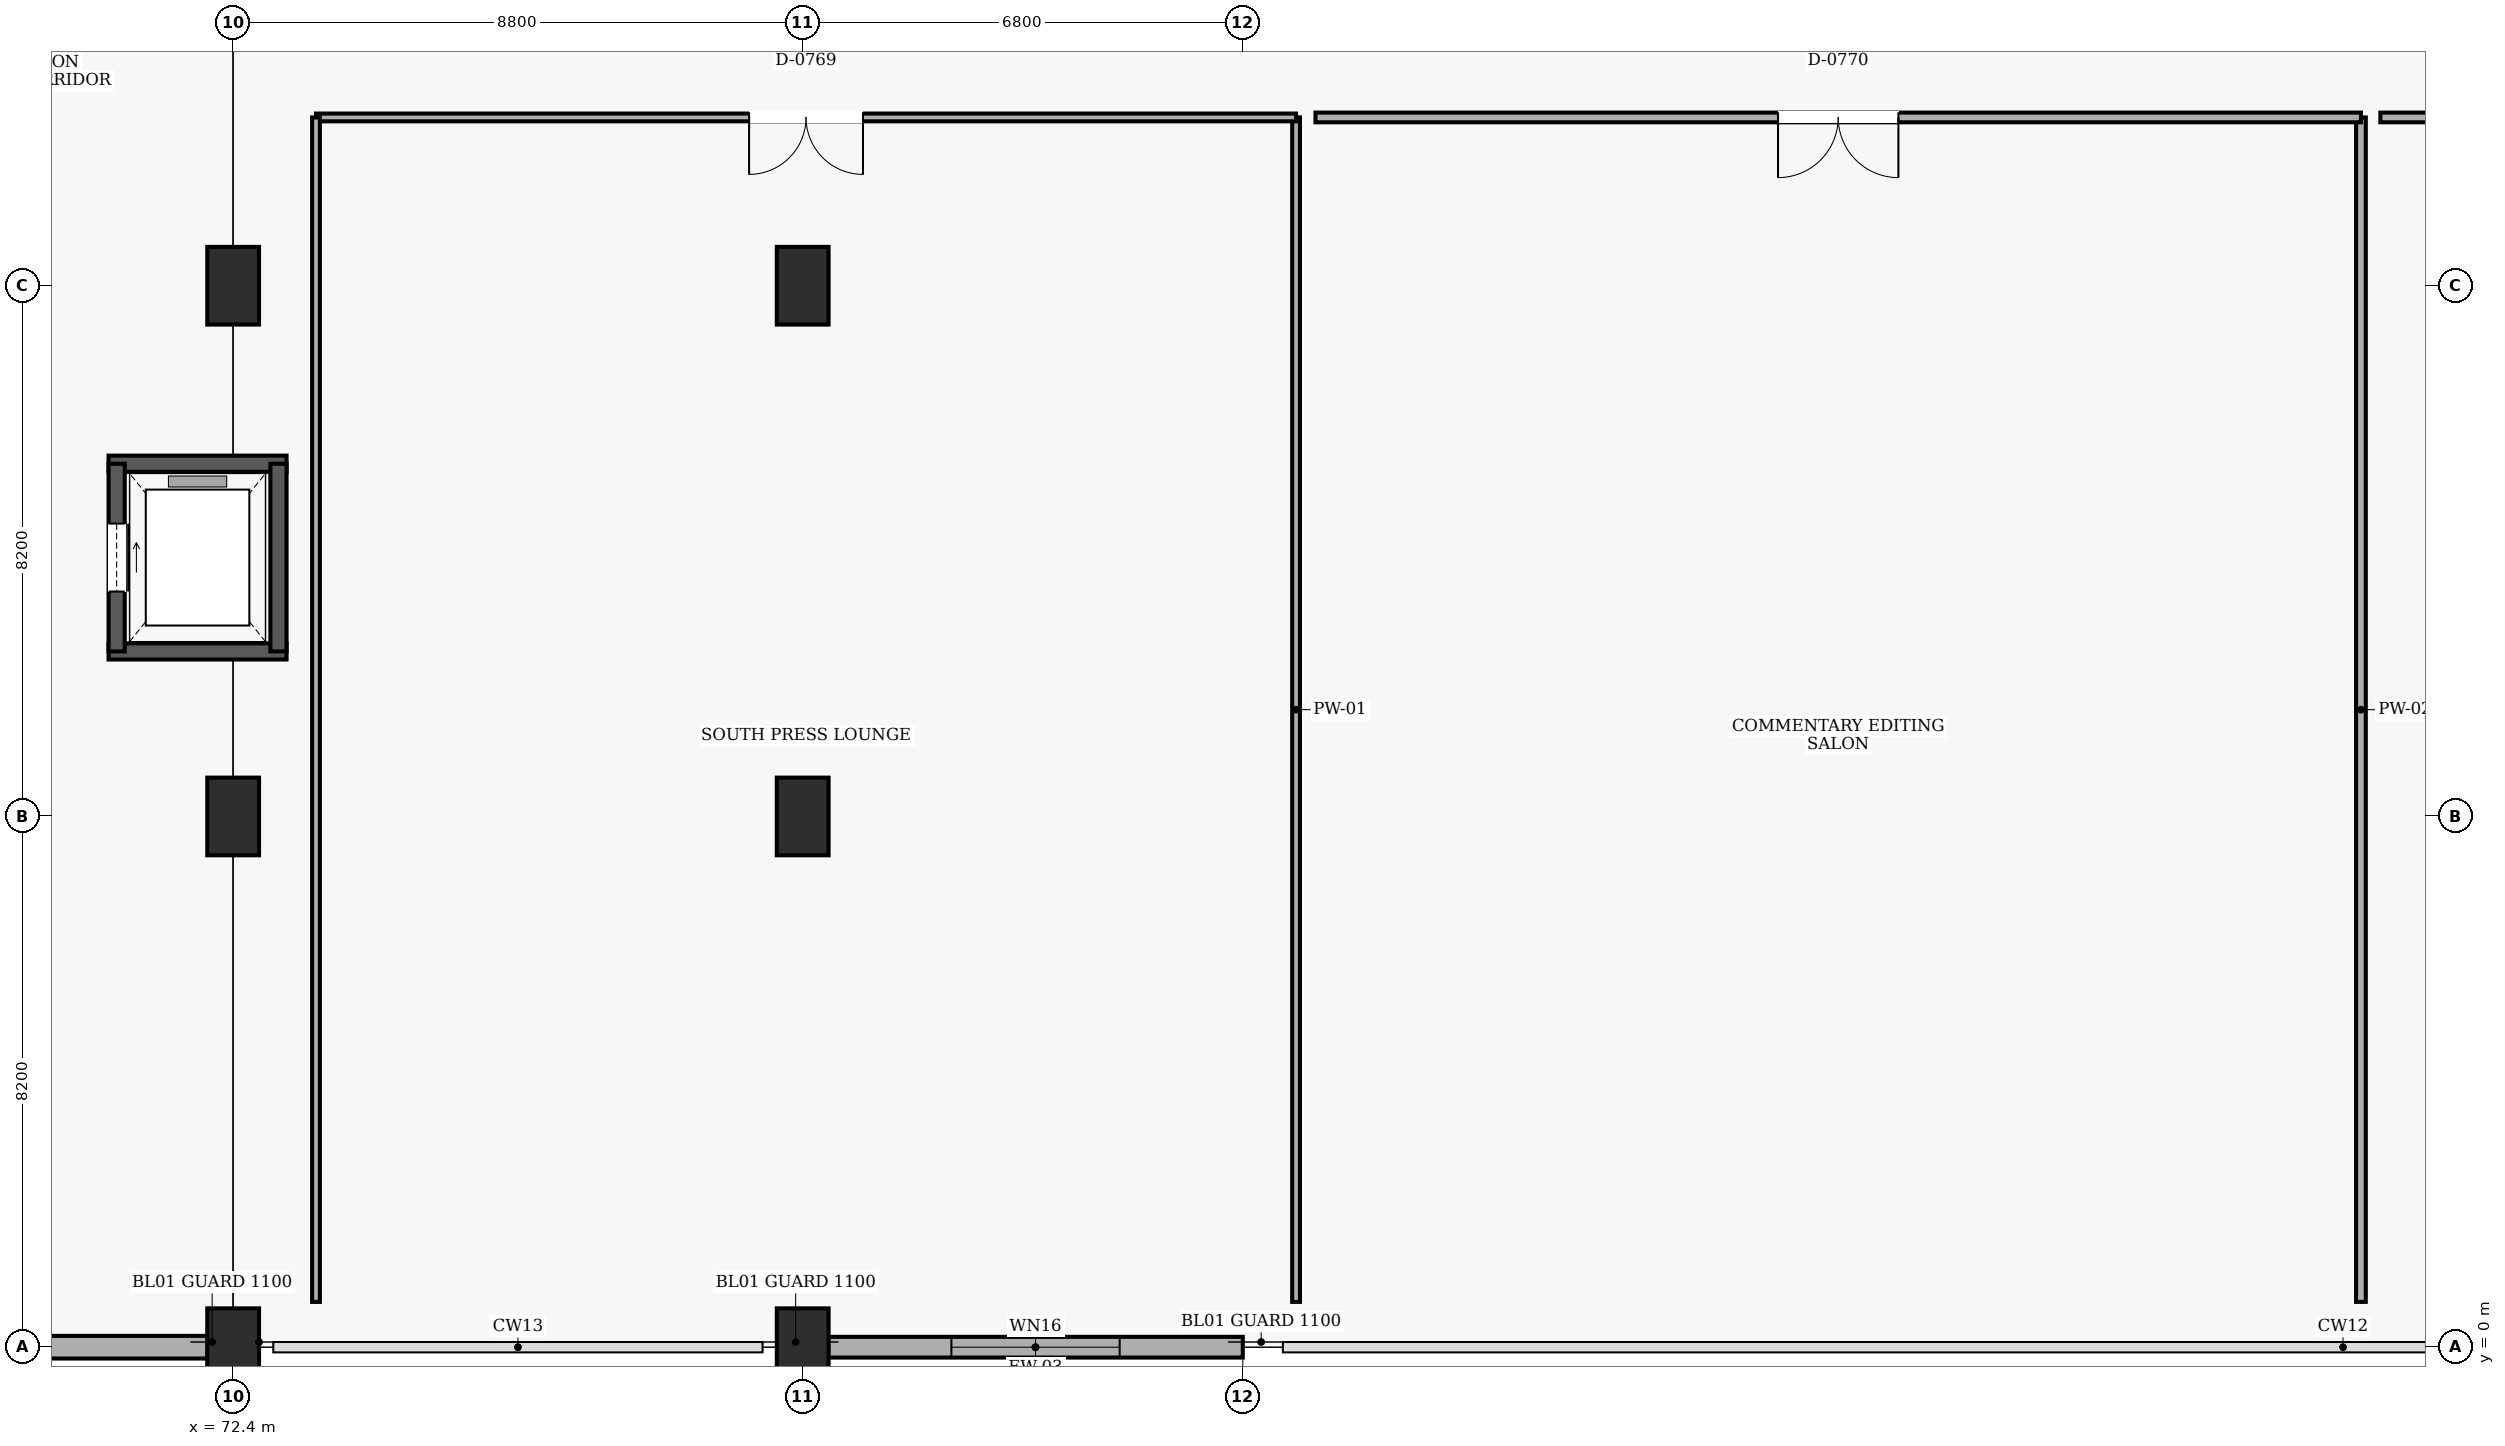
"""IFC4 building model, lengths in metres.
Left out: names, types, materials, properties, quantities, classifications, styles, units other than length and angle.
Written with IfcOpenShell. Run it as: python <this file> out.ifc"""

import sys

from ifc_helpers import new_model, si_unit, direction, frame, frame_2d, origin, origin_2d, place, context, subcontext, project, spatial, rectangle, extrude, element, fill, save


model = new_model("IFC4")
c1 = context("Model", 3, precision=1e-05, world=origin(), true_north=direction((0.0, 1.0)))
c2 = subcontext(c1, "Body", "Model", "MODEL_VIEW")
j1 = project(units=[si_unit("LENGTHUNIT", "METRE"), si_unit("PLANEANGLEUNIT", "RADIAN")], contexts=[c1])
p1 = place(None, origin())
s1 = spatial("IfcSite", under=j1, at=p1, CompositionType="ELEMENT")
p2 = place(p1, origin())
s2 = spatial("IfcBuilding", under=s1, at=p2, CompositionType="ELEMENT")
p3 = place(p2, frame((0.0, 0.0, 19.8)))
s3 = spatial("IfcBuildingStorey", under=s2, at=p3, CompositionType="ELEMENT", Elevation=19.8)
for number, where, z_axis, x_axis in (
    (1, (72.4, 0.0, 0.0), (0.0, 0.0, 1.0), (1.0, 0.0, 0.0)),
    (2, (72.4, 8.2, 0.0), (0.0, 0.0, 1.0), (1.0, 0.0, 0.0)),
    (3, (72.4, 16.4, 0.0), (0.0, 0.0, 1.0), (1.0, 0.0, 0.0)),
    (4, (81.2, 0.0, 0.0), (0.0, 0.0, 1.0), (1.0, 0.0, 0.0)),
    (5, (81.2, 8.2, 0.0), (0.0, 0.0, 1.0), (1.0, 0.0, 0.0)),
    (6, (81.2, 16.4, 0.0), (0.0, 0.0, 1.0), (1.0, 0.0, 0.0)),
):
    element("IfcColumn", number, at=place(p3, frame(where, z_axis=z_axis, x_axis=x_axis)), inside=s3, PredefinedType="COLUMN", context=c2, shape_type="SweptSolid", body=[
        extrude(rectangle(XDim=0.8, YDim=1.2, at=origin_2d()), origin(), (0.0, 0.0, 1.0), 4.8),
    ])
p4 = place(p3, frame((88.0, 0.0, 0.0), z_axis=(0.0, 0.0, 1.0), x_axis=(-1.0, 0.0, 0.0)))
e7 = element("IfcWall", 7, at=p4, inside=s3, PredefinedType="SOLIDWALL", context=c2, shape_type="SweptSolid", body=[
    extrude(rectangle(XDim=6.405, YDim=0.32, at=frame_2d((3.203, 0.0))), origin(), (0.0, 0.0, 1.0), 4.48),
])
p5 = place(p4, frame((1.903, 0.0, 0.9)))
e8 = element("IfcOpeningElement", 8, at=p5, cuts=e7, PredefinedType="OPENING", context=c2, shape_type="SweptSolid", body=[
    extrude(rectangle(XDim=2.6, YDim=2.1, at=frame_2d((1.3, 1.05))), frame((0.0, 0.17, 0.0), z_axis=(0.0, -1.0, 0.0), x_axis=(1.0, 0.0, 0.0)), (0.0, 0.0, 1.0), 0.34),
])
p6 = place(p3, frame((72.005, 0.0, 0.0), z_axis=(0.0, 0.0, 1.0), x_axis=(-1.0, 0.0, 0.0)))
e9 = element("IfcWall", 9, at=p6, inside=s3, PredefinedType="SOLIDWALL", context=c2, shape_type="SweptSolid", body=[
    extrude(rectangle(XDim=8.06, YDim=0.35, at=frame_2d((4.03, 0.0))), origin(), (0.0, 0.0, 1.0), 3.68),
])
p7 = place(p6, frame((2.53, 0.0, 0.9)))
e10 = element("IfcOpeningElement", 10, at=p7, cuts=e9, PredefinedType="OPENING", context=c2, shape_type="SweptSolid", body=[
    extrude(rectangle(XDim=3.0, YDim=2.1, at=frame_2d((1.5, 1.05))), frame((0.0, 0.185, 0.0), z_axis=(0.0, -1.0, 0.0), x_axis=(1.0, 0.0, 0.0)), (0.0, 0.0, 1.0), 0.37),
])
for number, where, z_axis, x_axis in (
    (11, (70.475, 10.75, 0.0), (0.0, 0.0, 1.0), (1.0, 0.0, 0.0)),
    (12, (73.225, 13.65, 0.0), (0.0, 0.0, 1.0), (-1.0, 0.0, 0.0)),
):
    element("IfcWall", number, at=place(p3, frame(where, z_axis=z_axis, x_axis=x_axis)), inside=s3, PredefinedType="SHEAR", context=c2, shape_type="SweptSolid", body=[
        extrude(rectangle(XDim=2.75, YDim=0.25, at=frame_2d((1.375, 0.0))), origin(), (0.0, 0.0, 1.0), 4.5),
    ])
p8 = place(p3, frame((70.6, 13.65, 0.0), z_axis=(0.0, 0.0, 1.0), x_axis=(0.0, -1.0, 0.0)))
e13 = element("IfcWall", 13, at=p8, inside=s3, PredefinedType="SHEAR", context=c2, shape_type="SweptSolid", body=[
    extrude(rectangle(XDim=2.9, YDim=0.25, at=frame_2d((1.45, 0.0))), origin(), (0.0, 0.0, 1.0), 4.5),
])
p9 = place(p8, frame((0.925, 0.0, 0.0)))
e14 = element("IfcOpeningElement", 14, at=p9, cuts=e13, PredefinedType="OPENING", context=c2, shape_type="SweptSolid", body=[
    extrude(rectangle(XDim=1.05, YDim=2.15, at=frame_2d((0.525, 1.075))), frame((0.0, 0.135, 0.0), z_axis=(0.0, -1.0, 0.0), x_axis=(1.0, 0.0, 0.0)), (0.0, 0.0, 1.0), 0.27),
])
p10 = place(p3, frame((73.1, 10.75, 0.0), z_axis=(0.0, 0.0, 1.0), x_axis=(0.0, 1.0, 0.0)))
e15 = element("IfcWall", 15, at=p10, inside=s3, PredefinedType="SHEAR", context=c2, shape_type="SweptSolid", body=[
    extrude(rectangle(XDim=2.9, YDim=0.25, at=frame_2d((1.45, 0.0))), origin(), (0.0, 0.0, 1.0), 4.5),
])
p11 = place(p3, frame((88.823, 0.7, 0.0), z_axis=(0.0, 0.0, 1.0), x_axis=(0.0, 1.0, 0.0)))
e16 = element("IfcWall", 16, at=p11, inside=s3, PredefinedType="PARTITIONING", context=c2, shape_type="SweptSolid", body=[
    extrude(rectangle(XDim=18.3, YDim=0.12, at=frame_2d((9.15, 0.0))), origin(), (0.0, 0.0, 1.0), 4.5),
])
p12 = place(p3, frame((88.823, 19.0, 0.0), z_axis=(0.0, 0.0, 1.0), x_axis=(-1.0, 0.0, 0.0)))
e17 = element("IfcWall", 17, at=p12, inside=s3, PredefinedType="PARTITIONING", context=c2, shape_type="SweptSolid", body=[
    extrude(rectangle(XDim=15.143, YDim=0.12, at=frame_2d((7.572, 0.0))), origin(), (0.0, 0.0, 1.0), 4.5),
])
p13 = place(p12, frame((6.692, 0.0, 0.0)))
e18 = element("IfcOpeningElement", 18, at=p13, cuts=e17, PredefinedType="OPENING", context=c2, shape_type="SweptSolid", body=[
    extrude(rectangle(XDim=1.76, YDim=2.25, at=frame_2d((0.88, 1.125))), frame((0.0, 0.07, 0.0), z_axis=(0.0, -1.0, 0.0), x_axis=(1.0, 0.0, 0.0)), (0.0, 0.0, 1.0), 0.14),
])
p14 = place(p3, frame((73.68, 19.0, 0.0), z_axis=(0.0, 0.0, 1.0), x_axis=(0.0, -1.0, 0.0)))
e19 = element("IfcWall", 19, at=p14, inside=s3, PredefinedType="PARTITIONING", context=c2, shape_type="SweptSolid", body=[
    extrude(rectangle(XDim=18.3, YDim=0.12, at=frame_2d((9.15, 0.0))), origin(), (0.0, 0.0, 1.0), 4.5),
])
p15 = place(p3, frame((105.277, 0.7, 0.0), z_axis=(0.0, 0.0, 1.0), x_axis=(0.0, 1.0, 0.0)))
e20 = element("IfcWall", 20, at=p15, inside=s3, PredefinedType="PARTITIONING", context=c2, shape_type="SweptSolid", body=[
    extrude(rectangle(XDim=18.3, YDim=0.15, at=frame_2d((9.15, 0.0))), origin(), (0.0, 0.0, 1.0), 4.5),
])
p16 = place(p3, frame((105.277, 19.0, 0.0), z_axis=(0.0, 0.0, 1.0), x_axis=(-1.0, 0.0, 0.0)))
e21 = element("IfcWall", 21, at=p16, inside=s3, PredefinedType="PARTITIONING", context=c2, shape_type="SweptSolid", body=[
    extrude(rectangle(XDim=16.153, YDim=0.15, at=frame_2d((8.077, 0.0))), origin(), (0.0, 0.0, 1.0), 4.5),
])
p17 = place(p16, frame((7.147, 0.0, 0.0)))
e22 = element("IfcOpeningElement", 22, at=p17, cuts=e21, PredefinedType="OPENING", context=c2, shape_type="SweptSolid", body=[
    extrude(rectangle(XDim=1.86, YDim=2.3, at=frame_2d((0.93, 1.15))), frame((0.0, 0.085, 0.0), z_axis=(0.0, -1.0, 0.0), x_axis=(1.0, 0.0, 0.0)), (0.0, 0.0, 1.0), 0.17),
])
p18 = place(p3, frame((121.73, 19.0, 0.0), z_axis=(0.0, 0.0, 1.0), x_axis=(-1.0, 0.0, 0.0)))
e23 = element("IfcWall", 23, at=p18, inside=s3, PredefinedType="PARTITIONING", context=c2, shape_type="SweptSolid", body=[
    extrude(rectangle(XDim=16.153, YDim=0.15, at=frame_2d((8.077, 0.0))), origin(), (0.0, 0.0, 1.0), 4.5),
])
p19 = place(p18, frame((7.097, 0.0, 0.0)))
e24 = element("IfcOpeningElement", 24, at=p19, cuts=e23, PredefinedType="OPENING", context=c2, shape_type="SweptSolid", body=[
    extrude(rectangle(XDim=1.96, YDim=2.3, at=frame_2d((0.98, 1.15))), frame((0.0, 0.085, 0.0), z_axis=(0.0, -1.0, 0.0), x_axis=(1.0, 0.0, 0.0)), (0.0, 0.0, 1.0), 0.17),
])
p20 = place(p5, origin())
e25 = element("IfcWindow", 25, at=p20, inside=s3, PartitioningType="SINGLE_PANEL", PredefinedType="WINDOW", context=c2, shape_type="SweptSolid", body=[
    extrude(rectangle(XDim=2.6, YDim=2.1, at=frame_2d((1.3, 1.05))), frame((0.0, 0.03, 0.0), z_axis=(0.0, -1.0, 0.0), x_axis=(1.0, 0.0, 0.0)), (0.0, 0.0, 1.0), 0.06),
])
fill(e8, e25)
p21 = place(p9, origin())
e26 = element("IfcDoor", 26, at=p21, inside=s3, OperationType="SLIDING_TO_RIGHT", PredefinedType="DOOR", context=c2, shape_type="SweptSolid", body=[
    extrude(rectangle(XDim=1.05, YDim=2.15, at=frame_2d((0.525, 1.075))), frame((0.0, 0.025, 0.0), z_axis=(0.0, -1.0, 0.0), x_axis=(1.0, 0.0, 0.0)), (0.0, 0.0, 1.0), 0.05),
])
fill(e14, e26)
p22 = place(p13, origin())
e27 = element("IfcDoor", 27, at=p22, inside=s3, OperationType="DOUBLE_DOOR_SINGLE_SWING", PredefinedType="DOOR", context=c2, shape_type="SweptSolid", body=[
    extrude(rectangle(XDim=1.76, YDim=2.25, at=frame_2d((0.88, 1.125))), frame((0.0, 0.025, 0.0), z_axis=(0.0, -1.0, 0.0), x_axis=(1.0, 0.0, 0.0)), (0.0, 0.0, 1.0), 0.05),
])
fill(e18, e27)
p23 = place(p17, origin())
e28 = element("IfcDoor", 28, at=p23, inside=s3, OperationType="DOUBLE_DOOR_SINGLE_SWING", PredefinedType="DOOR", context=c2, shape_type="SweptSolid", body=[
    extrude(rectangle(XDim=1.86, YDim=2.3, at=frame_2d((0.93, 1.15))), frame((0.0, 0.025, 0.0), z_axis=(0.0, -1.0, 0.0), x_axis=(1.0, 0.0, 0.0)), (0.0, 0.0, 1.0), 0.05),
])
fill(e22, e28)
save(model, sys.argv[1])
